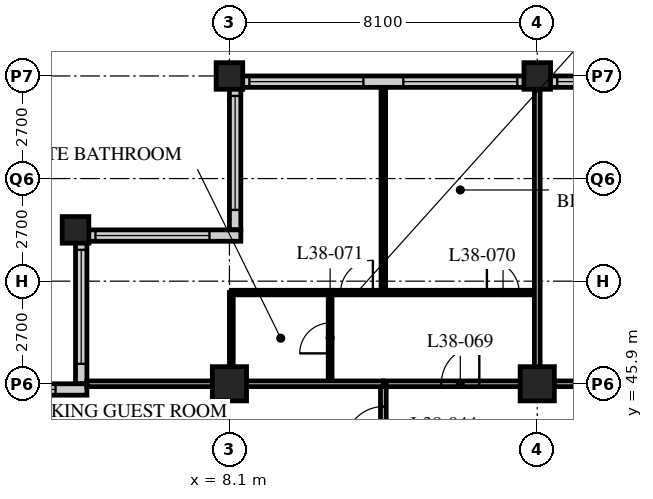
"""IFC4 building model, lengths in metres.
Left out: names, types, materials, properties, quantities, classifications, styles, units other than length and angle.
Written with IfcOpenShell. Run it as: python <this file> out.ifc"""

import sys

from ifc_helpers import new_model, si_unit, direction, frame, frame_2d, origin, origin_2d, place, context, subcontext, project, spatial, rectangle, hollow_rectangle, extrude, element, fill, save


model = new_model("IFC4")
c1 = context("Model", 3, precision=1e-05, world=origin(), true_north=direction((0.0, 1.0)))
c2 = subcontext(c1, "Body", "Model", "MODEL_VIEW")
j1 = project(units=[si_unit("LENGTHUNIT", "METRE"), si_unit("PLANEANGLEUNIT", "RADIAN")], contexts=[c1])
p1 = place(None, origin())
s1 = spatial("IfcSite", under=j1, at=p1, CompositionType="ELEMENT")
p2 = place(p1, origin())
s2 = spatial("IfcBuilding", under=s1, at=p2, CompositionType="ELEMENT")
p3 = place(p2, frame((0.0, 0.0, 147.6)))
s3 = spatial("IfcBuildingStorey", under=s2, at=p3, CompositionType="ELEMENT", Elevation=147.6)
p4 = place(p3, frame((4.05, 49.95, 0.0), z_axis=(0.0, 0.0, 1.0), x_axis=(1.0, 0.0, 0.0)))
e1 = element("IfcColumn", 1, at=p4, inside=s3, PredefinedType="COLUMN", context=c2, shape_type="SweptSolid", body=[
    extrude(hollow_rectangle(XDim=0.7, YDim=0.7, WallThickness=0.07, at=origin_2d()), origin(), (0.0, 0.0, 1.0), 3.4),
])
p5 = place(p3, frame((8.1, 45.9, 0.0), z_axis=(0.0, 0.0, 1.0), x_axis=(1.0, 0.0, 0.0)))
e2 = element("IfcColumn", 2, at=p5, inside=s3, PredefinedType="COLUMN", context=c2, shape_type="SweptSolid", body=[
    extrude(hollow_rectangle(XDim=0.9, YDim=0.9, WallThickness=0.1, at=origin_2d()), origin(), (0.0, 0.0, 1.0), 3.4),
])
p6 = place(p3, frame((8.1, 54.0, 0.0), z_axis=(0.0, 0.0, 1.0), x_axis=(1.0, 0.0, 0.0)))
e3 = element("IfcColumn", 3, at=p6, inside=s3, PredefinedType="COLUMN", context=c2, shape_type="SweptSolid", body=[
    extrude(hollow_rectangle(XDim=0.7, YDim=0.7, WallThickness=0.07, at=origin_2d()), origin(), (0.0, 0.0, 1.0), 3.4),
])
p7 = place(p3, frame((16.2, 45.9, 0.0), z_axis=(0.0, 0.0, 1.0), x_axis=(1.0, 0.0, 0.0)))
e4 = element("IfcColumn", 4, at=p7, inside=s3, PredefinedType="COLUMN", context=c2, shape_type="SweptSolid", body=[
    extrude(hollow_rectangle(XDim=0.9, YDim=0.9, WallThickness=0.1, at=origin_2d()), origin(), (0.0, 0.0, 1.0), 3.4),
])
p8 = place(p3, frame((16.2, 54.0, 0.0), z_axis=(0.0, 0.0, 1.0), x_axis=(1.0, 0.0, 0.0)))
e5 = element("IfcColumn", 5, at=p8, inside=s3, PredefinedType="COLUMN", context=c2, shape_type="SweptSolid", body=[
    extrude(hollow_rectangle(XDim=0.7, YDim=0.7, WallThickness=0.07, at=origin_2d()), origin(), (0.0, 0.0, 1.0), 3.4),
])
p9 = place(p3, frame((48.3, 53.85, 0.0), z_axis=(0.0, 0.0, 1.0), x_axis=(-1.0, 0.0, 0.0)))
e6 = element("IfcWall", 6, at=p9, inside=s3, PredefinedType="SOLIDWALL", context=c2, shape_type="SweptSolid", body=[
    extrude(rectangle(XDim=40.2, YDim=0.3, at=frame_2d((20.1, 0.0))), origin(), (0.0, 0.0, 1.0), 3.19),
])
p10 = place(p9, frame((0.225, 0.0, 0.9)))
e7 = element("IfcOpeningElement", 7, at=p10, cuts=e6, PredefinedType="OPENING", context=c2, shape_type="SweptSolid", body=[
    extrude(rectangle(XDim=3.0, YDim=1.4, at=frame_2d((1.5, 0.7))), frame((0.0, 0.16, 0.0), z_axis=(0.0, -1.0, 0.0), x_axis=(1.0, 0.0, 0.0)), (0.0, 0.0, 1.0), 0.32),
])
p11 = place(p9, frame((4.275, 0.0, 0.9)))
e8 = element("IfcOpeningElement", 8, at=p11, cuts=e6, PredefinedType="OPENING", context=c2, shape_type="SweptSolid", body=[
    extrude(rectangle(XDim=3.0, YDim=1.4, at=frame_2d((1.5, 0.7))), frame((0.0, 0.16, 0.0), z_axis=(0.0, -1.0, 0.0), x_axis=(1.0, 0.0, 0.0)), (0.0, 0.0, 1.0), 0.32),
])
p12 = place(p9, frame((8.325, 0.0, 0.9)))
e9 = element("IfcOpeningElement", 9, at=p12, cuts=e6, PredefinedType="OPENING", context=c2, shape_type="SweptSolid", body=[
    extrude(rectangle(XDim=3.0, YDim=1.4, at=frame_2d((1.5, 0.7))), frame((0.0, 0.16, 0.0), z_axis=(0.0, -1.0, 0.0), x_axis=(1.0, 0.0, 0.0)), (0.0, 0.0, 1.0), 0.32),
])
p13 = place(p9, frame((12.375, 0.0, 0.9)))
e10 = element("IfcOpeningElement", 10, at=p13, cuts=e6, PredefinedType="OPENING", context=c2, shape_type="SweptSolid", body=[
    extrude(rectangle(XDim=3.0, YDim=1.4, at=frame_2d((1.5, 0.7))), frame((0.0, 0.16, 0.0), z_axis=(0.0, -1.0, 0.0), x_axis=(1.0, 0.0, 0.0)), (0.0, 0.0, 1.0), 0.32),
])
p14 = place(p9, frame((16.425, 0.0, 0.9)))
e11 = element("IfcOpeningElement", 11, at=p14, cuts=e6, PredefinedType="OPENING", context=c2, shape_type="SweptSolid", body=[
    extrude(rectangle(XDim=3.0, YDim=1.4, at=frame_2d((1.5, 0.7))), frame((0.0, 0.16, 0.0), z_axis=(0.0, -1.0, 0.0), x_axis=(1.0, 0.0, 0.0)), (0.0, 0.0, 1.0), 0.32),
])
p15 = place(p9, frame((20.475, 0.0, 0.9)))
e12 = element("IfcOpeningElement", 12, at=p15, cuts=e6, PredefinedType="OPENING", context=c2, shape_type="SweptSolid", body=[
    extrude(rectangle(XDim=3.0, YDim=1.4, at=frame_2d((1.5, 0.7))), frame((0.0, 0.16, 0.0), z_axis=(0.0, -1.0, 0.0), x_axis=(1.0, 0.0, 0.0)), (0.0, 0.0, 1.0), 0.32),
])
p16 = place(p9, frame((24.525, 0.0, 0.9)))
e13 = element("IfcOpeningElement", 13, at=p16, cuts=e6, PredefinedType="OPENING", context=c2, shape_type="SweptSolid", body=[
    extrude(rectangle(XDim=3.0, YDim=1.4, at=frame_2d((1.5, 0.7))), frame((0.0, 0.16, 0.0), z_axis=(0.0, -1.0, 0.0), x_axis=(1.0, 0.0, 0.0)), (0.0, 0.0, 1.0), 0.32),
])
p17 = place(p9, frame((28.575, 0.0, 0.9)))
e14 = element("IfcOpeningElement", 14, at=p17, cuts=e6, PredefinedType="OPENING", context=c2, shape_type="SweptSolid", body=[
    extrude(rectangle(XDim=3.0, YDim=1.4, at=frame_2d((1.5, 0.7))), frame((0.0, 0.16, 0.0), z_axis=(0.0, -1.0, 0.0), x_axis=(1.0, 0.0, 0.0)), (0.0, 0.0, 1.0), 0.32),
])
p18 = place(p9, frame((32.625, 0.0, 0.9)))
e15 = element("IfcOpeningElement", 15, at=p18, cuts=e6, PredefinedType="OPENING", context=c2, shape_type="SweptSolid", body=[
    extrude(rectangle(XDim=3.0, YDim=1.4, at=frame_2d((1.5, 0.7))), frame((0.0, 0.16, 0.0), z_axis=(0.0, -1.0, 0.0), x_axis=(1.0, 0.0, 0.0)), (0.0, 0.0, 1.0), 0.32),
])
p19 = place(p9, frame((36.675, 0.0, 0.9)))
e16 = element("IfcOpeningElement", 16, at=p19, cuts=e6, PredefinedType="OPENING", context=c2, shape_type="SweptSolid", body=[
    extrude(rectangle(XDim=3.0, YDim=1.4, at=frame_2d((1.5, 0.7))), frame((0.0, 0.16, 0.0), z_axis=(0.0, -1.0, 0.0), x_axis=(1.0, 0.0, 0.0)), (0.0, 0.0, 1.0), 0.32),
])
p20 = place(p3, frame((8.25, 53.7, 0.0), z_axis=(0.0, 0.0, 1.0), x_axis=(0.0, -1.0, 0.0)))
e17 = element("IfcWall", 17, at=p20, inside=s3, PredefinedType="SOLIDWALL", context=c2, shape_type="SweptSolid", body=[
    extrude(rectangle(XDim=3.75, YDim=0.3, at=frame_2d((1.875, 0.0))), origin(), (0.0, 0.0, 1.0), 3.19),
])
p21 = place(p20, frame((0.225, 0.0, 0.9)))
e18 = element("IfcOpeningElement", 18, at=p21, cuts=e17, PredefinedType="OPENING", context=c2, shape_type="SweptSolid", body=[
    extrude(rectangle(XDim=3.0, YDim=1.4, at=frame_2d((1.5, 0.7))), frame((0.0, 0.16, 0.0), z_axis=(0.0, -1.0, 0.0), x_axis=(1.0, 0.0, 0.0)), (0.0, 0.0, 1.0), 0.32),
])
p22 = place(p3, frame((8.4, 49.8, 0.0), z_axis=(0.0, 0.0, 1.0), x_axis=(-1.0, 0.0, 0.0)))
e19 = element("IfcWall", 19, at=p22, inside=s3, PredefinedType="SOLIDWALL", context=c2, shape_type="SweptSolid", body=[
    extrude(rectangle(XDim=4.35, YDim=0.3, at=frame_2d((2.175, 0.0))), origin(), (0.0, 0.0, 1.0), 3.19),
])
p23 = place(p22, frame((0.825, 0.0, 0.9)))
e20 = element("IfcOpeningElement", 20, at=p23, cuts=e19, PredefinedType="OPENING", context=c2, shape_type="SweptSolid", body=[
    extrude(rectangle(XDim=3.0, YDim=1.4, at=frame_2d((1.5, 0.7))), frame((0.0, 0.16, 0.0), z_axis=(0.0, -1.0, 0.0), x_axis=(1.0, 0.0, 0.0)), (0.0, 0.0, 1.0), 0.32),
])
p24 = place(p3, frame((4.2, 49.65, 0.0), z_axis=(0.0, 0.0, 1.0), x_axis=(0.0, -1.0, 0.0)))
e21 = element("IfcWall", 21, at=p24, inside=s3, PredefinedType="SOLIDWALL", context=c2, shape_type="SweptSolid", body=[
    extrude(rectangle(XDim=3.75, YDim=0.3, at=frame_2d((1.875, 0.0))), origin(), (0.0, 0.0, 1.0), 3.19),
])
p25 = place(p24, frame((0.225, 0.0, 0.9)))
e22 = element("IfcOpeningElement", 22, at=p25, cuts=e21, PredefinedType="OPENING", context=c2, shape_type="SweptSolid", body=[
    extrude(rectangle(XDim=3.0, YDim=1.4, at=frame_2d((1.5, 0.7))), frame((0.0, 0.16, 0.0), z_axis=(0.0, -1.0, 0.0), x_axis=(1.0, 0.0, 0.0)), (0.0, 0.0, 1.0), 0.32),
])
p26 = place(p3, frame((4.35, 45.75, 0.0), z_axis=(0.0, 0.0, 1.0), x_axis=(-1.0, 0.0, 0.0)))
e23 = element("IfcWall", 23, at=p26, inside=s3, PredefinedType="SOLIDWALL", context=c2, shape_type="SweptSolid", body=[
    extrude(rectangle(XDim=4.35, YDim=0.3, at=frame_2d((2.175, 0.0))), origin(), (0.0, 0.0, 1.0), 3.19),
])
p27 = place(p26, frame((0.825, 0.0, 0.9)))
e24 = element("IfcOpeningElement", 24, at=p27, cuts=e23, PredefinedType="OPENING", context=c2, shape_type="SweptSolid", body=[
    extrude(rectangle(XDim=3.0, YDim=1.4, at=frame_2d((1.5, 0.7))), frame((0.0, 0.16, 0.0), z_axis=(0.0, -1.0, 0.0), x_axis=(1.0, 0.0, 0.0)), (0.0, 0.0, 1.0), 0.32),
])
p28 = place(p3, frame((12.15, 45.9, 0.0), z_axis=(0.0, 0.0, 1.0), x_axis=(1.0, 0.0, 0.0)))
e25 = element("IfcWall", 25, at=p28, inside=s3, PredefinedType="PARTITIONING", context=c2, shape_type="SweptSolid", body=[
    extrude(rectangle(XDim=36.45, YDim=0.15, at=frame_2d((18.225, 0.0))), origin(), (0.0, 0.0, 1.0), 2.42),
])
p29 = place(p28, frame((9.225, 0.0, 0.0)))
e26 = element("IfcOpeningElement", 26, at=p29, cuts=e25, PredefinedType="OPENING", context=c2, shape_type="SweptSolid", body=[
    extrude(rectangle(XDim=1.8, YDim=2.4, at=frame_2d((0.9, 1.2))), frame((0.0, 0.085, 0.0), z_axis=(0.0, -1.0, 0.0), x_axis=(1.0, 0.0, 0.0)), (0.0, 0.0, 1.0), 0.17),
])
p30 = place(p28, frame((21.65, 0.0, 0.0)))
e27 = element("IfcOpeningElement", 27, at=p30, cuts=e25, PredefinedType="OPENING", context=c2, shape_type="SweptSolid", body=[
    extrude(rectangle(XDim=1.0, YDim=2.1, at=frame_2d((0.5, 1.05))), frame((0.0, 0.085, 0.0), z_axis=(0.0, -1.0, 0.0), x_axis=(1.0, 0.0, 0.0)), (0.0, 0.0, 1.0), 0.17),
])
p31 = place(p28, frame((24.9, 0.0, 0.0)))
e28 = element("IfcOpeningElement", 28, at=p31, cuts=e25, PredefinedType="OPENING", context=c2, shape_type="SweptSolid", body=[
    extrude(rectangle(XDim=1.0, YDim=2.1, at=frame_2d((0.5, 1.05))), frame((0.0, 0.085, 0.0), z_axis=(0.0, -1.0, 0.0), x_axis=(1.0, 0.0, 0.0)), (0.0, 0.0, 1.0), 0.17),
])
p32 = place(p28, frame((30.8, 0.0, 0.0)))
e29 = element("IfcOpeningElement", 29, at=p32, cuts=e25, PredefinedType="OPENING", context=c2, shape_type="SweptSolid", body=[
    extrude(rectangle(XDim=1.0, YDim=2.1, at=frame_2d((0.5, 1.05))), frame((0.0, 0.085, 0.0), z_axis=(0.0, -1.0, 0.0), x_axis=(1.0, 0.0, 0.0)), (0.0, 0.0, 1.0), 0.17),
])
p33 = place(p28, frame((32.825, 0.0, 0.0)))
e30 = element("IfcOpeningElement", 30, at=p33, cuts=e25, PredefinedType="OPENING", context=c2, shape_type="SweptSolid", body=[
    extrude(rectangle(XDim=1.0, YDim=2.1, at=frame_2d((0.5, 1.05))), frame((0.0, 0.085, 0.0), z_axis=(0.0, -1.0, 0.0), x_axis=(1.0, 0.0, 0.0)), (0.0, 0.0, 1.0), 0.17),
])
p34 = place(p28, frame((1.525, 0.0, 0.0)))
e31 = element("IfcOpeningElement", 31, at=p34, cuts=e25, PredefinedType="OPENING", context=c2, shape_type="SweptSolid", body=[
    extrude(rectangle(XDim=1.0, YDim=2.1, at=frame_2d((0.5, 1.05))), frame((0.0, 0.085, 0.0), z_axis=(0.0, -1.0, 0.0), x_axis=(1.0, 0.0, 0.0)), (0.0, 0.0, 1.0), 0.17),
])
p35 = place(p3, frame((12.15, 21.6, 0.0), z_axis=(0.0, 0.0, 1.0), x_axis=(0.0, 1.0, 0.0)))
e32 = element("IfcWall", 32, at=p35, inside=s3, PredefinedType="PARTITIONING", context=c2, shape_type="SweptSolid", body=[
    extrude(rectangle(XDim=24.3, YDim=0.15, at=frame_2d((12.15, 0.0))), origin(), (0.0, 0.0, 1.0), 3.19),
])
p36 = place(p35, frame((5.575, 0.0, 0.0)))
e33 = element("IfcOpeningElement", 33, at=p36, cuts=e32, PredefinedType="OPENING", context=c2, shape_type="SweptSolid", body=[
    extrude(rectangle(XDim=1.0, YDim=2.1, at=frame_2d((0.5, 1.05))), frame((0.0, 0.085, 0.0), z_axis=(0.0, -1.0, 0.0), x_axis=(1.0, 0.0, 0.0)), (0.0, 0.0, 1.0), 0.17),
])
p37 = place(p35, frame((14.05, 0.0, 0.0)))
e34 = element("IfcOpeningElement", 34, at=p37, cuts=e32, PredefinedType="OPENING", context=c2, shape_type="SweptSolid", body=[
    extrude(rectangle(XDim=1.0, YDim=2.1, at=frame_2d((0.5, 1.05))), frame((0.0, 0.085, 0.0), z_axis=(0.0, -1.0, 0.0), x_axis=(1.0, 0.0, 0.0)), (0.0, 0.0, 1.0), 0.17),
])
p38 = place(p35, frame((22.7, 0.0, 0.0)))
e35 = element("IfcOpeningElement", 35, at=p38, cuts=e32, PredefinedType="OPENING", context=c2, shape_type="SweptSolid", body=[
    extrude(rectangle(XDim=1.0, YDim=2.1, at=frame_2d((0.5, 1.05))), frame((0.0, 0.085, 0.0), z_axis=(0.0, -1.0, 0.0), x_axis=(1.0, 0.0, 0.0)), (0.0, 0.0, 1.0), 0.17),
])
p39 = place(p3, frame((10.75, 45.9, 0.0), z_axis=(0.0, 0.0, 1.0), x_axis=(0.0, 1.0, 0.0)))
e36 = element("IfcWall", 36, at=p39, inside=s3, PredefinedType="PARTITIONING", context=c2, shape_type="SweptSolid", body=[
    extrude(rectangle(XDim=2.4, YDim=0.1, at=frame_2d((1.2, 0.0))), origin(), (0.0, 0.0, 1.0), 3.19),
])
p40 = place(p39, frame((0.8, 0.0, 0.0)))
e37 = element("IfcOpeningElement", 37, at=p40, cuts=e36, PredefinedType="OPENING", context=c2, shape_type="SweptSolid", body=[
    extrude(rectangle(XDim=0.8, YDim=2.1, at=frame_2d((0.4, 1.05))), frame((0.0, 0.06, 0.0), z_axis=(0.0, -1.0, 0.0), x_axis=(1.0, 0.0, 0.0)), (0.0, 0.0, 1.0), 0.12),
])
p41 = place(p3, frame((8.15, 45.9, 0.0), z_axis=(0.0, 0.0, 1.0), x_axis=(0.0, 1.0, 0.0)))
e38 = element("IfcWall", 38, at=p41, inside=s3, PredefinedType="PARTITIONING", context=c2, shape_type="SweptSolid", body=[
    extrude(rectangle(XDim=2.4, YDim=0.1, at=frame_2d((1.2, 0.0))), origin(), (0.0, 0.0, 1.0), 2.42),
])
p42 = place(p3, frame((8.15, 48.3, 0.0), z_axis=(0.0, 0.0, 1.0), x_axis=(1.0, 0.0, 0.0)))
e39 = element("IfcWall", 39, at=p42, inside=s3, PredefinedType="PARTITIONING", context=c2, shape_type="SweptSolid", body=[
    extrude(rectangle(XDim=8.05, YDim=0.12, at=frame_2d((4.025, 0.0))), origin(), (0.0, 0.0, 1.0), 3.19),
])
p43 = place(p42, frame((6.725, 0.0, 0.0)))
e40 = element("IfcOpeningElement", 40, at=p43, cuts=e39, PredefinedType="OPENING", context=c2, shape_type="SweptSolid", body=[
    extrude(rectangle(XDim=0.85, YDim=2.1, at=frame_2d((0.425, 1.05))), frame((0.0, 0.07, 0.0), z_axis=(0.0, -1.0, 0.0), x_axis=(1.0, 0.0, 0.0)), (0.0, 0.0, 1.0), 0.14),
])
p44 = place(p42, frame((2.875, 0.0, 0.0)))
e41 = element("IfcOpeningElement", 41, at=p44, cuts=e39, PredefinedType="OPENING", context=c2, shape_type="SweptSolid", body=[
    extrude(rectangle(XDim=0.85, YDim=2.1, at=frame_2d((0.425, 1.05))), frame((0.0, 0.07, 0.0), z_axis=(0.0, -1.0, 0.0), x_axis=(1.0, 0.0, 0.0)), (0.0, 0.0, 1.0), 0.14),
])
p45 = place(p3, frame((12.15, 48.3, 0.0), z_axis=(0.0, 0.0, 1.0), x_axis=(0.0, 1.0, 0.0)))
e42 = element("IfcWall", 42, at=p45, inside=s3, PredefinedType="PARTITIONING", context=c2, shape_type="SweptSolid", body=[
    extrude(rectangle(XDim=5.4, YDim=0.12, at=frame_2d((2.7, 0.0))), origin(), (0.0, 0.0, 1.0), 3.19),
])
p46 = place(p3, frame((4.35, 45.9, 0.0), z_axis=(0.0, 0.0, 1.0), x_axis=(1.0, 0.0, 0.0)))
e43 = element("IfcWall", 43, at=p46, inside=s3, PredefinedType="PARTITIONING", context=c2, shape_type="SweptSolid", body=[
    extrude(rectangle(XDim=7.8, YDim=0.15, at=frame_2d((3.9, 0.0))), origin(), (0.0, 0.0, 1.0), 2.42),
])
p47 = place(p3, frame((16.2, 45.9, 0.0), z_axis=(0.0, 0.0, 1.0), x_axis=(0.0, 1.0, 0.0)))
e44 = element("IfcWall", 44, at=p47, inside=s3, PredefinedType="PARTITIONING", context=c2, shape_type="SweptSolid", body=[
    extrude(rectangle(XDim=7.8, YDim=0.15, at=frame_2d((3.9, 0.0))), origin(), (0.0, 0.0, 1.0), 2.42),
])
p48 = place(p17, origin())
e45 = element("IfcWindow", 45, at=p48, inside=s3, PartitioningType="SINGLE_PANEL", PredefinedType="WINDOW", context=c2, shape_type="SweptSolid", body=[
    extrude(rectangle(XDim=3.0, YDim=1.4, at=frame_2d((1.5, 0.7))), frame((0.0, 0.03, 0.0), z_axis=(0.0, -1.0, 0.0), x_axis=(1.0, 0.0, 0.0)), (0.0, 0.0, 1.0), 0.06),
])
fill(e14, e45)
p49 = place(p18, origin())
e46 = element("IfcWindow", 46, at=p49, inside=s3, PartitioningType="SINGLE_PANEL", PredefinedType="WINDOW", context=c2, shape_type="SweptSolid", body=[
    extrude(rectangle(XDim=3.0, YDim=1.4, at=frame_2d((1.5, 0.7))), frame((0.0, 0.03, 0.0), z_axis=(0.0, -1.0, 0.0), x_axis=(1.0, 0.0, 0.0)), (0.0, 0.0, 1.0), 0.06),
])
fill(e15, e46)
p50 = place(p19, origin())
e47 = element("IfcWindow", 47, at=p50, inside=s3, PartitioningType="SINGLE_PANEL", PredefinedType="WINDOW", context=c2, shape_type="SweptSolid", body=[
    extrude(rectangle(XDim=3.0, YDim=1.4, at=frame_2d((1.5, 0.7))), frame((0.0, 0.03, 0.0), z_axis=(0.0, -1.0, 0.0), x_axis=(1.0, 0.0, 0.0)), (0.0, 0.0, 1.0), 0.06),
])
fill(e16, e47)
p51 = place(p21, origin())
e48 = element("IfcWindow", 48, at=p51, inside=s3, PartitioningType="SINGLE_PANEL", PredefinedType="WINDOW", context=c2, shape_type="SweptSolid", body=[
    extrude(rectangle(XDim=3.0, YDim=1.4, at=frame_2d((1.5, 0.7))), frame((0.0, 0.03, 0.0), z_axis=(0.0, -1.0, 0.0), x_axis=(1.0, 0.0, 0.0)), (0.0, 0.0, 1.0), 0.06),
])
fill(e18, e48)
p52 = place(p23, origin())
e49 = element("IfcWindow", 49, at=p52, inside=s3, PartitioningType="SINGLE_PANEL", PredefinedType="WINDOW", context=c2, shape_type="SweptSolid", body=[
    extrude(rectangle(XDim=3.0, YDim=1.4, at=frame_2d((1.5, 0.7))), frame((0.0, 0.03, 0.0), z_axis=(0.0, -1.0, 0.0), x_axis=(1.0, 0.0, 0.0)), (0.0, 0.0, 1.0), 0.06),
])
fill(e20, e49)
p53 = place(p25, origin())
e50 = element("IfcWindow", 50, at=p53, inside=s3, PartitioningType="SINGLE_PANEL", PredefinedType="WINDOW", context=c2, shape_type="SweptSolid", body=[
    extrude(rectangle(XDim=3.0, YDim=1.4, at=frame_2d((1.5, 0.7))), frame((0.0, 0.03, 0.0), z_axis=(0.0, -1.0, 0.0), x_axis=(1.0, 0.0, 0.0)), (0.0, 0.0, 1.0), 0.06),
])
fill(e22, e50)
p54 = place(p27, origin())
e51 = element("IfcWindow", 51, at=p54, inside=s3, PartitioningType="SINGLE_PANEL", PredefinedType="WINDOW", context=c2, shape_type="SweptSolid", body=[
    extrude(rectangle(XDim=3.0, YDim=1.4, at=frame_2d((1.5, 0.7))), frame((0.0, 0.03, 0.0), z_axis=(0.0, -1.0, 0.0), x_axis=(1.0, 0.0, 0.0)), (0.0, 0.0, 1.0), 0.06),
])
fill(e24, e51)
p55 = place(p38, origin())
e52 = element("IfcDoor", 52, at=p55, inside=s3, OperationType="SINGLE_SWING_LEFT", PredefinedType="DOOR", context=c2, shape_type="SweptSolid", body=[
    extrude(rectangle(XDim=1.0, YDim=2.1, at=frame_2d((0.5, 1.05))), frame((0.0, 0.025, 0.0), z_axis=(0.0, -1.0, 0.0), x_axis=(1.0, 0.0, 0.0)), (0.0, 0.0, 1.0), 0.05),
])
fill(e35, e52)
p56 = place(p34, origin())
e53 = element("IfcDoor", 53, at=p56, inside=s3, OperationType="SINGLE_SWING_RIGHT", PredefinedType="DOOR", context=c2, shape_type="SweptSolid", body=[
    extrude(rectangle(XDim=1.0, YDim=2.1, at=frame_2d((0.5, 1.05))), frame((0.0, 0.025, 0.0), z_axis=(0.0, -1.0, 0.0), x_axis=(1.0, 0.0, 0.0)), (0.0, 0.0, 1.0), 0.05),
])
fill(e31, e53)
p57 = place(p43, origin())
e54 = element("IfcDoor", 54, at=p57, inside=s3, OperationType="SINGLE_SWING_LEFT", PredefinedType="DOOR", context=c2, shape_type="SweptSolid", body=[
    extrude(rectangle(XDim=0.85, YDim=2.1, at=frame_2d((0.425, 1.05))), frame((0.0, 0.025, 0.0), z_axis=(0.0, -1.0, 0.0), x_axis=(1.0, 0.0, 0.0)), (0.0, 0.0, 1.0), 0.05),
])
fill(e40, e54)
p58 = place(p40, origin())
e55 = element("IfcDoor", 55, at=p58, inside=s3, OperationType="SINGLE_SWING_LEFT", PredefinedType="DOOR", context=c2, shape_type="SweptSolid", body=[
    extrude(rectangle(XDim=0.8, YDim=2.1, at=frame_2d((0.4, 1.05))), frame((0.0, 0.025, 0.0), z_axis=(0.0, -1.0, 0.0), x_axis=(1.0, 0.0, 0.0)), (0.0, 0.0, 1.0), 0.05),
])
fill(e37, e55)
p59 = place(p44, origin())
e56 = element("IfcDoor", 56, at=p59, inside=s3, OperationType="SINGLE_SWING_RIGHT", PredefinedType="DOOR", context=c2, shape_type="SweptSolid", body=[
    extrude(rectangle(XDim=0.85, YDim=2.1, at=frame_2d((0.425, 1.05))), frame((0.0, 0.025, 0.0), z_axis=(0.0, -1.0, 0.0), x_axis=(1.0, 0.0, 0.0)), (0.0, 0.0, 1.0), 0.05),
])
fill(e41, e56)
save(model, sys.argv[1])
